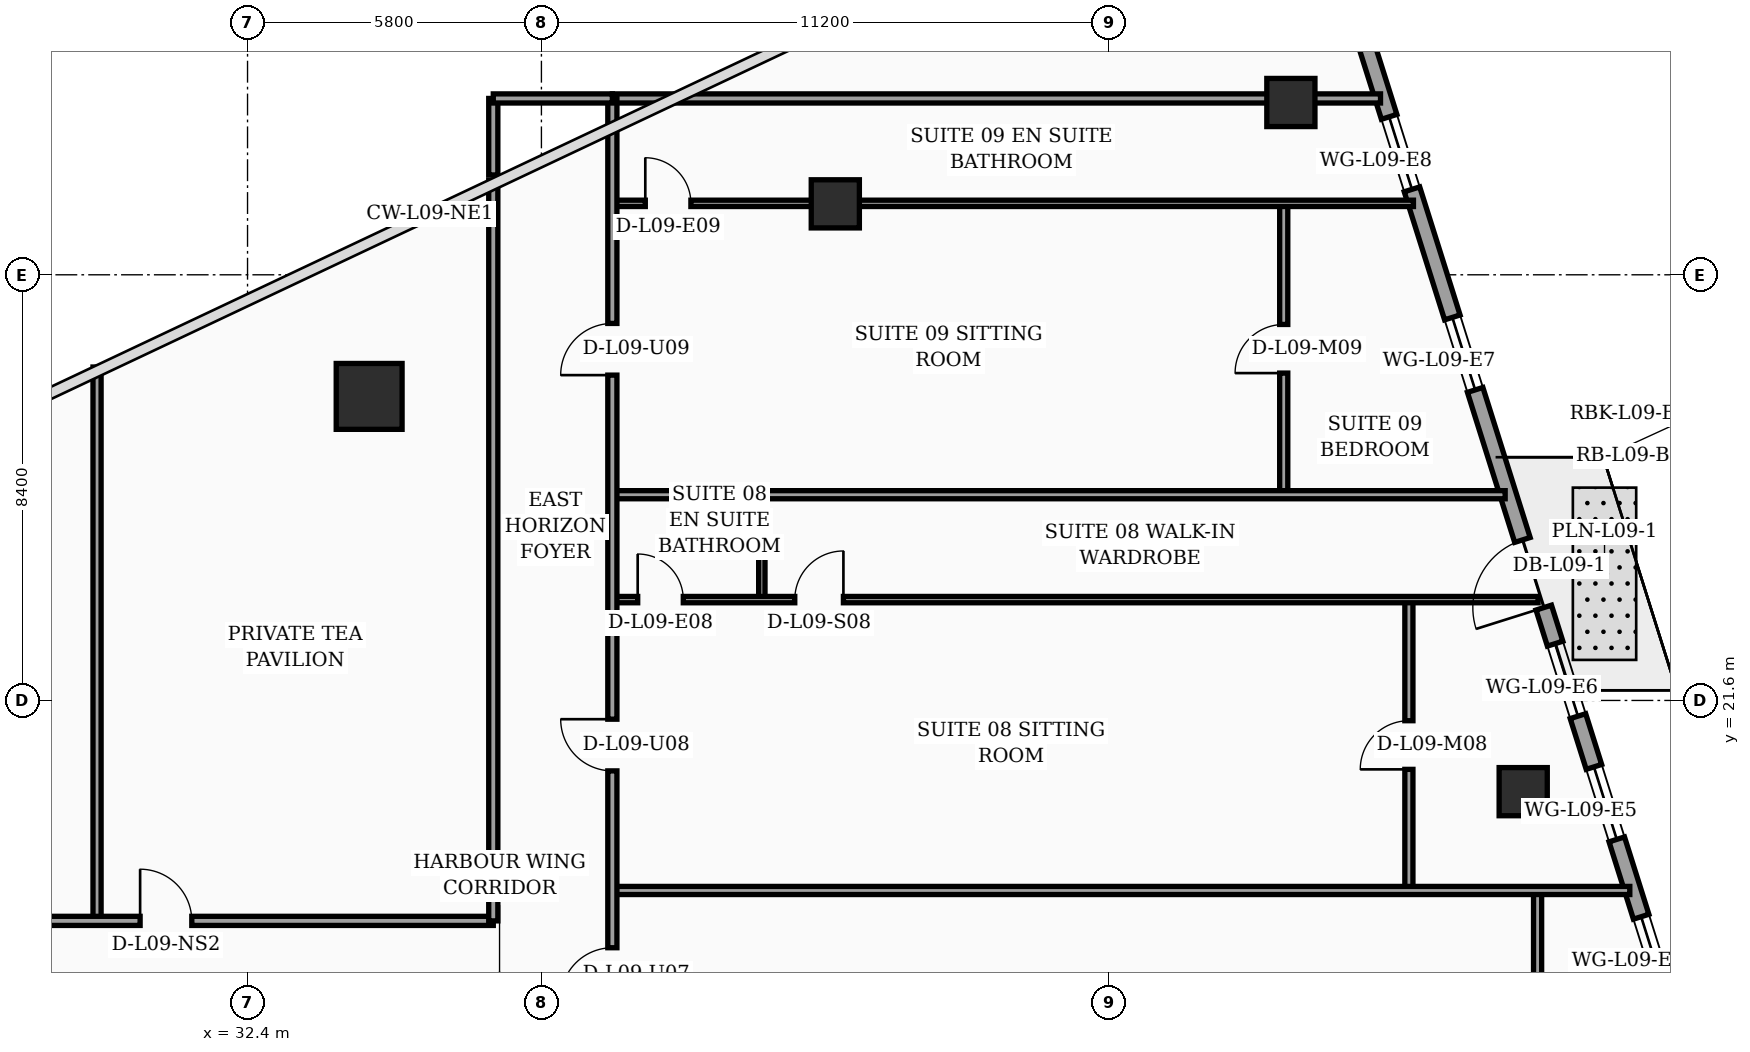
"""IFC4 building model, lengths in metres.
Left out: names, types, materials, properties, quantities, classifications, styles, units other than length and angle.
Written with IfcOpenShell. Run it as: python <this file> out.ifc"""

import sys

from ifc_helpers import new_model, si_unit, direction, frame, frame_2d, origin, origin_2d, place, context, subcontext, project, spatial, rectangle, hollow_rectangle, circle, extrude, element, fill, save


model = new_model("IFC4")
c1 = context("Model", 3, precision=1e-05, world=origin(), true_north=direction((0.0, 1.0)))
c2 = subcontext(c1, "Body", "Model", "MODEL_VIEW")
j1 = project(units=[si_unit("LENGTHUNIT", "METRE"), si_unit("PLANEANGLEUNIT", "RADIAN")], contexts=[c1])
p1 = place(None, origin())
s1 = spatial("IfcSite", under=j1, at=p1, CompositionType="ELEMENT")
p2 = place(p1, origin())
s2 = spatial("IfcBuilding", under=s1, at=p2, CompositionType="ELEMENT")
p3 = place(p2, frame((0.0, 0.0, 42.2)))
s3 = spatial("IfcBuildingStorey", under=s2, at=p3, CompositionType="ELEMENT", Elevation=42.2)
p4 = place(p3, frame((34.8, 27.6, 0.0), z_axis=(0.0, 0.0, 1.0), x_axis=(1.0, 0.0, 0.0)))
e1 = element("IfcColumn", 1, at=p4, inside=s3, PredefinedType="COLUMN", context=c2, shape_type="SweptSolid", body=[
    extrude(circle(Radius=0.65, at=origin_2d()), origin(), (0.0, 0.0, 1.0), 3.52),
])
for number, where, z_axis, x_axis in (
    (2, (44.0, 31.4, 0.0), (0.0, 0.0, 1.0), (1.0, 0.0, 0.0)),
    (3, (57.576, 19.8, 0.0), (0.0, 0.0, 1.0), (1.0, 0.0, 0.0)),
    (4, (52.991, 33.4, 0.0), (0.0, 0.0, 1.0), (1.0, 0.0, 0.0)),
):
    element("IfcColumn", number, at=place(p3, frame(where, z_axis=z_axis, x_axis=x_axis)), inside=s3, PredefinedType="COLUMN", context=c2, shape_type="SweptSolid", body=[
        extrude(hollow_rectangle(XDim=0.95, YDim=0.95, WallThickness=0.04, at=origin_2d()), origin(), (0.0, 0.0, 1.0), 3.52),
    ])
p5 = place(p3, frame((63.63, 5.505, 0.0), z_axis=(0.0, 0.0, 1.0), x_axis=(-0.300501856448, 0.953781229775, 0.0)))
e5 = element("IfcWall", 5, at=p5, inside=s3, PredefinedType="SOLIDWALL", context=c2, shape_type="SweptSolid", body=[
    extrude(rectangle(XDim=30.814, YDim=0.32, at=frame_2d((15.407, 0.0))), origin(), (0.0, 0.0, 1.0), 3.52),
])
p6 = place(p5, frame((18.796, 0.0, 0.0)))
e6 = element("IfcOpeningElement", 6, at=p6, cuts=e5, PredefinedType="OPENING", context=c2, shape_type="SweptSolid", body=[
    extrude(rectangle(XDim=1.4, YDim=2.25, at=frame_2d((0.7, 1.125))), frame((0.0, 0.17, 0.0), z_axis=(0.0, -1.0, 0.0), x_axis=(1.0, 0.0, 0.0)), (0.0, 0.0, 1.0), 0.34),
])
p7 = place(p5, frame((2.65, 0.0, 0.75)))
e7 = element("IfcOpeningElement", 7, at=p7, cuts=e5, PredefinedType="OPENING", context=c2, shape_type="SweptSolid", body=[
    extrude(rectangle(XDim=1.5, YDim=1.6, at=frame_2d((0.75, 0.8))), frame((0.0, 0.17, 0.0), z_axis=(0.0, -1.0, 0.0), x_axis=(1.0, 0.0, 0.0)), (0.0, 0.0, 1.0), 0.34),
])
p8 = place(p5, frame((4.7, 0.0, 0.75)))
e8 = element("IfcOpeningElement", 8, at=p8, cuts=e5, PredefinedType="OPENING", context=c2, shape_type="SweptSolid", body=[
    extrude(rectangle(XDim=1.5, YDim=1.6, at=frame_2d((0.75, 0.8))), frame((0.0, 0.17, 0.0), z_axis=(0.0, -1.0, 0.0), x_axis=(1.0, 0.0, 0.0)), (0.0, 0.0, 1.0), 0.34),
])
p9 = place(p5, frame((7.8, 0.0, 0.75)))
e9 = element("IfcOpeningElement", 9, at=p9, cuts=e5, PredefinedType="OPENING", context=c2, shape_type="SweptSolid", body=[
    extrude(rectangle(XDim=1.5, YDim=1.6, at=frame_2d((0.75, 0.8))), frame((0.0, 0.17, 0.0), z_axis=(0.0, -1.0, 0.0), x_axis=(1.0, 0.0, 0.0)), (0.0, 0.0, 1.0), 0.34),
])
p10 = place(p5, frame((10.9, 0.0, 0.75)))
e10 = element("IfcOpeningElement", 10, at=p10, cuts=e5, PredefinedType="OPENING", context=c2, shape_type="SweptSolid", body=[
    extrude(rectangle(XDim=1.5, YDim=1.6, at=frame_2d((0.75, 0.8))), frame((0.0, 0.17, 0.0), z_axis=(0.0, -1.0, 0.0), x_axis=(1.0, 0.0, 0.0)), (0.0, 0.0, 1.0), 0.34),
])
p11 = place(p5, frame((14.0, 0.0, 0.75)))
e11 = element("IfcOpeningElement", 11, at=p11, cuts=e5, PredefinedType="OPENING", context=c2, shape_type="SweptSolid", body=[
    extrude(rectangle(XDim=1.5, YDim=1.6, at=frame_2d((0.75, 0.8))), frame((0.0, 0.17, 0.0), z_axis=(0.0, -1.0, 0.0), x_axis=(1.0, 0.0, 0.0)), (0.0, 0.0, 1.0), 0.34),
])
p12 = place(p5, frame((16.55, 0.0, 0.75)))
e12 = element("IfcOpeningElement", 12, at=p12, cuts=e5, PredefinedType="OPENING", context=c2, shape_type="SweptSolid", body=[
    extrude(rectangle(XDim=1.5, YDim=1.6, at=frame_2d((0.75, 0.8))), frame((0.0, 0.17, 0.0), z_axis=(0.0, -1.0, 0.0), x_axis=(1.0, 0.0, 0.0)), (0.0, 0.0, 1.0), 0.34),
])
p13 = place(p5, frame((23.3, 0.0, 0.75)))
e13 = element("IfcOpeningElement", 13, at=p13, cuts=e5, PredefinedType="OPENING", context=c2, shape_type="SweptSolid", body=[
    extrude(rectangle(XDim=1.5, YDim=1.6, at=frame_2d((0.75, 0.8))), frame((0.0, 0.17, 0.0), z_axis=(0.0, -1.0, 0.0), x_axis=(1.0, 0.0, 0.0)), (0.0, 0.0, 1.0), 0.34),
])
p14 = place(p5, frame((27.45, 0.0, 0.75)))
e14 = element("IfcOpeningElement", 14, at=p14, cuts=e5, PredefinedType="OPENING", context=c2, shape_type="SweptSolid", body=[
    extrude(rectangle(XDim=1.5, YDim=1.6, at=frame_2d((0.75, 0.8))), frame((0.0, 0.17, 0.0), z_axis=(0.0, -1.0, 0.0), x_axis=(1.0, 0.0, 0.0)), (0.0, 0.0, 1.0), 0.34),
])
p15 = place(p3, frame((29.43, 17.25, 0.0), z_axis=(0.0, 0.0, 1.0), x_axis=(0.0, 1.0, 0.0)))
e15 = element("IfcWall", 15, at=p15, inside=s3, PredefinedType="PARTITIONING", context=c2, shape_type="SweptSolid", body=[
    extrude(rectangle(XDim=10.93, YDim=0.16, at=frame_2d((5.465, 0.0))), origin(), (0.0, 0.0, 1.0), 2.82),
])
p16 = place(p3, frame((21.5, 17.25, 0.0), z_axis=(0.0, 0.0, 1.0), x_axis=(1.0, 0.0, 0.0)))
e16 = element("IfcWall", 16, at=p16, inside=s3, PredefinedType="PARTITIONING", context=c2, shape_type="SweptSolid", body=[
    extrude(rectangle(XDim=15.75, YDim=0.18, at=frame_2d((7.875, 0.0))), origin(), (0.0, 0.0, 1.0), 2.82),
])
p17 = place(p16, frame((0.95, 0.0, 0.0)))
e17 = element("IfcOpeningElement", 17, at=p17, cuts=e16, PredefinedType="OPENING", context=c2, shape_type="SweptSolid", body=[
    extrude(rectangle(XDim=1.02, YDim=2.2, at=frame_2d((0.51, 1.1))), frame((0.0, 0.1, 0.0), z_axis=(0.0, -1.0, 0.0), x_axis=(1.0, 0.0, 0.0)), (0.0, 0.0, 1.0), 0.2),
])
p18 = place(p16, frame((8.78, 0.0, 0.0)))
e18 = element("IfcOpeningElement", 18, at=p18, cuts=e16, PredefinedType="OPENING", context=c2, shape_type="SweptSolid", body=[
    extrude(rectangle(XDim=1.02, YDim=2.2, at=frame_2d((0.51, 1.1))), frame((0.0, 0.1, 0.0), z_axis=(0.0, -1.0, 0.0), x_axis=(1.0, 0.0, 0.0)), (0.0, 0.0, 1.0), 0.2),
])
p19 = place(p3, frame((37.25, 17.25, 0.0), z_axis=(0.0, 0.0, 1.0), x_axis=(0.0, 1.0, 0.0)))
e19 = element("IfcWall", 19, at=p19, inside=s3, PredefinedType="PARTITIONING", context=c2, shape_type="SweptSolid", body=[
    extrude(rectangle(XDim=14.62, YDim=0.18, at=frame_2d((7.31, 0.0))), origin(), (0.0, 0.0, 1.0), 2.82),
])
p20 = place(p3, frame((57.86, 7.45, 0.0), z_axis=(0.0, 0.0, 1.0), x_axis=(0.0, 1.0, 0.0)))
e20 = element("IfcWall", 20, at=p20, inside=s3, PredefinedType="PARTITIONING", context=c2, shape_type="SweptSolid", body=[
    extrude(rectangle(XDim=10.4, YDim=0.16, at=frame_2d((5.2, 0.0))), origin(), (0.0, 0.0, 1.0), 3.02),
])
p21 = place(p20, frame((4.72, 0.0, 0.0)))
e21 = element("IfcOpeningElement", 21, at=p21, cuts=e20, PredefinedType="OPENING", context=c2, shape_type="SweptSolid", body=[
    extrude(rectangle(XDim=0.96, YDim=2.2, at=frame_2d((0.48, 1.1))), frame((0.0, 0.09, 0.0), z_axis=(0.0, -1.0, 0.0), x_axis=(1.0, 0.0, 0.0)), (0.0, 0.0, 1.0), 0.18),
])
p22 = place(p3, frame((42.55, 23.59, 0.0), z_axis=(0.0, 0.0, 1.0), x_axis=(0.0, 1.0, 0.0)))
e22 = element("IfcWall", 22, at=p22, inside=s3, PredefinedType="PARTITIONING", context=c2, shape_type="SweptSolid", body=[
    extrude(rectangle(XDim=2.07, YDim=0.125, at=frame_2d((1.035, 0.0))), origin(), (0.0, 0.0, 1.0), 2.82),
])
p23 = place(p3, frame((55.32, 17.85, 0.0), z_axis=(0.0, 0.0, 1.0), x_axis=(0.0, 1.0, 0.0)))
e23 = element("IfcWall", 23, at=p23, inside=s3, PredefinedType="PARTITIONING", context=c2, shape_type="SweptSolid", body=[
    extrude(rectangle(XDim=5.74, YDim=0.16, at=frame_2d((2.87, 0.0))), origin(), (0.0, 0.0, 1.0), 2.82),
])
p24 = place(p23, frame((2.39, 0.0, 0.0)))
e24 = element("IfcOpeningElement", 24, at=p24, cuts=e23, PredefinedType="OPENING", context=c2, shape_type="SweptSolid", body=[
    extrude(rectangle(XDim=0.96, YDim=2.2, at=frame_2d((0.48, 1.1))), frame((0.0, 0.09, 0.0), z_axis=(0.0, -1.0, 0.0), x_axis=(1.0, 0.0, 0.0)), (0.0, 0.0, 1.0), 0.18),
])
p25 = place(p3, frame((39.6, 23.59, 0.0), z_axis=(0.0, 0.0, 1.0), x_axis=(1.0, 0.0, 0.0)))
e25 = element("IfcWall", 25, at=p25, inside=s3, PredefinedType="PARTITIONING", context=c2, shape_type="SweptSolid", body=[
    extrude(rectangle(XDim=18.27, YDim=0.125, at=frame_2d((9.135, 0.0))), origin(), (0.0, 0.0, 1.0), 2.82),
])
p26 = place(p25, frame((0.5, 0.0, 0.0)))
e26 = element("IfcOpeningElement", 26, at=p26, cuts=e25, PredefinedType="OPENING", context=c2, shape_type="SweptSolid", body=[
    extrude(rectangle(XDim=0.9, YDim=2.15, at=frame_2d((0.45, 1.075))), frame((0.0, 0.073, 0.0), z_axis=(0.0, -1.0, 0.0), x_axis=(1.0, 0.0, 0.0)), (0.0, 0.0, 1.0), 0.145),
])
p27 = place(p25, frame((3.6, 0.0, 0.0)))
e27 = element("IfcOpeningElement", 27, at=p27, cuts=e25, PredefinedType="OPENING", context=c2, shape_type="SweptSolid", body=[
    extrude(rectangle(XDim=0.96, YDim=2.2, at=frame_2d((0.48, 1.1))), frame((0.0, 0.073, 0.0), z_axis=(0.0, -1.0, 0.0), x_axis=(1.0, 0.0, 0.0)), (0.0, 0.0, 1.0), 0.145),
])
p28 = place(p3, frame((52.85, 25.66, 0.0), z_axis=(0.0, 0.0, 1.0), x_axis=(0.0, 1.0, 0.0)))
e28 = element("IfcWall", 28, at=p28, inside=s3, PredefinedType="PARTITIONING", context=c2, shape_type="SweptSolid", body=[
    extrude(rectangle(XDim=5.75, YDim=0.16, at=frame_2d((2.875, 0.0))), origin(), (0.0, 0.0, 1.0), 3.52),
])
p29 = place(p28, frame((2.4, 0.0, 0.0)))
e29 = element("IfcOpeningElement", 29, at=p29, cuts=e28, PredefinedType="OPENING", context=c2, shape_type="SweptSolid", body=[
    extrude(rectangle(XDim=0.96, YDim=2.2, at=frame_2d((0.48, 1.1))), frame((0.0, 0.09, 0.0), z_axis=(0.0, -1.0, 0.0), x_axis=(1.0, 0.0, 0.0)), (0.0, 0.0, 1.0), 0.18),
])
p30 = place(p3, frame((39.6, 31.41, 0.0), z_axis=(0.0, 0.0, 1.0), x_axis=(1.0, 0.0, 0.0)))
e30 = element("IfcWall", 30, at=p30, inside=s3, PredefinedType="PARTITIONING", context=c2, shape_type="SweptSolid", body=[
    extrude(rectangle(XDim=15.81, YDim=0.125, at=frame_2d((7.905, 0.0))), origin(), (0.0, 0.0, 1.0), 2.82),
])
p31 = place(p30, frame((0.65, 0.0, 0.0)))
e31 = element("IfcOpeningElement", 31, at=p31, cuts=e30, PredefinedType="OPENING", context=c2, shape_type="SweptSolid", body=[
    extrude(rectangle(XDim=0.9, YDim=2.15, at=frame_2d((0.45, 1.075))), frame((0.0, 0.073, 0.0), z_axis=(0.0, -1.0, 0.0), x_axis=(1.0, 0.0, 0.0)), (0.0, 0.0, 1.0), 0.145),
])
p32 = place(p3, frame((39.6, 25.66, 0.0), z_axis=(0.0, 0.0, 1.0), x_axis=(1.0, 0.0, 0.0)))
e32 = element("IfcWall", 32, at=p32, inside=s3, PredefinedType="PARTITIONING", context=c2, shape_type="SweptSolid", body=[
    extrude(rectangle(XDim=17.62, YDim=0.16, at=frame_2d((8.81, 0.0))), origin(), (0.0, 0.0, 1.0), 2.82),
])
p33 = place(p3, frame((39.6, 17.85, 0.0), z_axis=(0.0, 0.0, 1.0), x_axis=(1.0, 0.0, 0.0)))
e33 = element("IfcWall", 33, at=p33, inside=s3, PredefinedType="PARTITIONING", context=c2, shape_type="SweptSolid", body=[
    extrude(rectangle(XDim=20.08, YDim=0.16, at=frame_2d((10.04, 0.0))), origin(), (0.0, 0.0, 1.0), 2.82),
])
p34 = place(p3, frame((39.6, 33.48, 0.0), z_axis=(0.0, 0.0, 1.0), x_axis=(1.0, 0.0, 0.0)))
e34 = element("IfcWall", 34, at=p34, inside=s3, PredefinedType="PARTITIONING", context=c2, shape_type="SweptSolid", body=[
    extrude(rectangle(XDim=15.16, YDim=0.18, at=frame_2d((7.58, 0.0))), origin(), (0.0, 0.0, 1.0), 2.82),
])
p35 = place(p3, frame((39.6, 2.44, 0.0), z_axis=(0.0, 0.0, 1.0), x_axis=(0.0, 1.0, 0.0)))
e35 = element("IfcWall", 35, at=p35, inside=s3, PredefinedType="PARTITIONING", context=c2, shape_type="SweptSolid", body=[
    extrude(rectangle(XDim=31.04, YDim=0.18, at=frame_2d((15.52, 0.0))), origin(), (0.0, 0.0, 1.0), 2.82),
])
p36 = place(p35, frame((13.26, 0.0, 0.0)))
e36 = element("IfcOpeningElement", 36, at=p36, cuts=e35, PredefinedType="OPENING", context=c2, shape_type="SweptSolid", body=[
    extrude(rectangle(XDim=1.02, YDim=2.2, at=frame_2d((0.51, 1.1))), frame((0.0, 0.1, 0.0), z_axis=(0.0, -1.0, 0.0), x_axis=(1.0, 0.0, 0.0)), (0.0, 0.0, 1.0), 0.2),
])
p37 = place(p35, frame((17.77, 0.0, 0.0)))
e37 = element("IfcOpeningElement", 37, at=p37, cuts=e35, PredefinedType="OPENING", context=c2, shape_type="SweptSolid", body=[
    extrude(rectangle(XDim=1.02, YDim=2.2, at=frame_2d((0.51, 1.1))), frame((0.0, 0.1, 0.0), z_axis=(0.0, -1.0, 0.0), x_axis=(1.0, 0.0, 0.0)), (0.0, 0.0, 1.0), 0.2),
])
p38 = place(p35, frame((25.58, 0.0, 0.0)))
e38 = element("IfcOpeningElement", 38, at=p38, cuts=e35, PredefinedType="OPENING", context=c2, shape_type="SweptSolid", body=[
    extrude(rectangle(XDim=1.02, YDim=2.2, at=frame_2d((0.51, 1.1))), frame((0.0, 0.1, 0.0), z_axis=(0.0, -1.0, 0.0), x_axis=(1.0, 0.0, 0.0)), (0.0, 0.0, 1.0), 0.2),
])
p39 = place(p3, frame((37.25, 31.97, 0.0), z_axis=(0.0, 0.0, 1.0), x_axis=(0.0, 1.0, 0.0)))
e39 = element("IfcWall", 39, at=p39, inside=s3, PredefinedType="PARTITIONING", context=c2, shape_type="SweptSolid", body=[
    extrude(rectangle(XDim=1.51, YDim=0.18, at=frame_2d((0.755, 0.0))), origin(), (0.0, 0.0, 1.0), 3.52),
])
p40 = place(p3, frame((37.25, 33.48, 0.0), z_axis=(0.0, 0.0, 1.0), x_axis=(1.0, 0.0, 0.0)))
e40 = element("IfcWall", 40, at=p40, inside=s3, PredefinedType="PARTITIONING", context=c2, shape_type="SweptSolid", body=[
    extrude(rectangle(XDim=2.35, YDim=0.18, at=frame_2d((1.175, 0.0))), origin(), (0.0, 0.0, 1.0), 3.52),
])
p41 = place(p6, origin())
e41 = element("IfcDoor", 41, at=p41, inside=s3, OperationType="SINGLE_SWING_LEFT", PredefinedType="DOOR", context=c2, shape_type="SweptSolid", body=[
    extrude(rectangle(XDim=1.4, YDim=2.25, at=frame_2d((0.7, 1.125))), frame((0.0, 0.025, 0.0), z_axis=(0.0, -1.0, 0.0), x_axis=(1.0, 0.0, 0.0)), (0.0, 0.0, 1.0), 0.05),
])
fill(e6, e41)
p42 = place(p10, origin())
e42 = element("IfcWindow", 42, at=p42, inside=s3, PartitioningType="SINGLE_PANEL", PredefinedType="WINDOW", context=c2, shape_type="SweptSolid", body=[
    extrude(rectangle(XDim=1.5, YDim=1.6, at=frame_2d((0.75, 0.8))), frame((0.0, 0.03, 0.0), z_axis=(0.0, -1.0, 0.0), x_axis=(1.0, 0.0, 0.0)), (0.0, 0.0, 1.0), 0.06),
])
fill(e10, e42)
p43 = place(p11, origin())
e43 = element("IfcWindow", 43, at=p43, inside=s3, PartitioningType="SINGLE_PANEL", PredefinedType="WINDOW", context=c2, shape_type="SweptSolid", body=[
    extrude(rectangle(XDim=1.5, YDim=1.6, at=frame_2d((0.75, 0.8))), frame((0.0, 0.03, 0.0), z_axis=(0.0, -1.0, 0.0), x_axis=(1.0, 0.0, 0.0)), (0.0, 0.0, 1.0), 0.06),
])
fill(e11, e43)
p44 = place(p12, origin())
e44 = element("IfcWindow", 44, at=p44, inside=s3, PartitioningType="SINGLE_PANEL", PredefinedType="WINDOW", context=c2, shape_type="SweptSolid", body=[
    extrude(rectangle(XDim=1.5, YDim=1.6, at=frame_2d((0.75, 0.8))), frame((0.0, 0.03, 0.0), z_axis=(0.0, -1.0, 0.0), x_axis=(1.0, 0.0, 0.0)), (0.0, 0.0, 1.0), 0.06),
])
fill(e12, e44)
p45 = place(p13, origin())
e45 = element("IfcWindow", 45, at=p45, inside=s3, PartitioningType="SINGLE_PANEL", PredefinedType="WINDOW", context=c2, shape_type="SweptSolid", body=[
    extrude(rectangle(XDim=1.5, YDim=1.6, at=frame_2d((0.75, 0.8))), frame((0.0, 0.03, 0.0), z_axis=(0.0, -1.0, 0.0), x_axis=(1.0, 0.0, 0.0)), (0.0, 0.0, 1.0), 0.06),
])
fill(e13, e45)
p46 = place(p14, origin())
e46 = element("IfcWindow", 46, at=p46, inside=s3, PartitioningType="SINGLE_PANEL", PredefinedType="WINDOW", context=c2, shape_type="SweptSolid", body=[
    extrude(rectangle(XDim=1.5, YDim=1.6, at=frame_2d((0.75, 0.8))), frame((0.0, 0.03, 0.0), z_axis=(0.0, -1.0, 0.0), x_axis=(1.0, 0.0, 0.0)), (0.0, 0.0, 1.0), 0.06),
])
fill(e14, e46)
p47 = place(p18, origin())
e47 = element("IfcDoor", 47, at=p47, inside=s3, OperationType="SINGLE_SWING_LEFT", PredefinedType="DOOR", context=c2, shape_type="SweptSolid", body=[
    extrude(rectangle(XDim=1.02, YDim=2.2, at=frame_2d((0.51, 1.1))), frame((0.0, 0.025, 0.0), z_axis=(0.0, -1.0, 0.0), x_axis=(1.0, 0.0, 0.0)), (0.0, 0.0, 1.0), 0.05),
])
fill(e18, e47)
p48 = place(p24, origin())
e48 = element("IfcDoor", 48, at=p48, inside=s3, OperationType="SINGLE_SWING_LEFT", PredefinedType="DOOR", context=c2, shape_type="SweptSolid", body=[
    extrude(rectangle(XDim=0.96, YDim=2.2, at=frame_2d((0.48, 1.1))), frame((0.0, 0.025, 0.0), z_axis=(0.0, -1.0, 0.0), x_axis=(1.0, 0.0, 0.0)), (0.0, 0.0, 1.0), 0.05),
])
fill(e24, e48)
p49 = place(p26, origin())
e49 = element("IfcDoor", 49, at=p49, inside=s3, OperationType="SINGLE_SWING_LEFT", PredefinedType="DOOR", context=c2, shape_type="SweptSolid", body=[
    extrude(rectangle(XDim=0.9, YDim=2.15, at=frame_2d((0.45, 1.075))), frame((0.0, 0.025, 0.0), z_axis=(0.0, -1.0, 0.0), x_axis=(1.0, 0.0, 0.0)), (0.0, 0.0, 1.0), 0.05),
])
fill(e26, e49)
p50 = place(p27, origin())
e50 = element("IfcDoor", 50, at=p50, inside=s3, OperationType="SINGLE_SWING_RIGHT", PredefinedType="DOOR", context=c2, shape_type="SweptSolid", body=[
    extrude(rectangle(XDim=0.96, YDim=2.2, at=frame_2d((0.48, 1.1))), frame((0.0, 0.025, 0.0), z_axis=(0.0, -1.0, 0.0), x_axis=(1.0, 0.0, 0.0)), (0.0, 0.0, 1.0), 0.05),
])
fill(e27, e50)
p51 = place(p29, origin())
e51 = element("IfcDoor", 51, at=p51, inside=s3, OperationType="SINGLE_SWING_LEFT", PredefinedType="DOOR", context=c2, shape_type="SweptSolid", body=[
    extrude(rectangle(XDim=0.96, YDim=2.2, at=frame_2d((0.48, 1.1))), frame((0.0, 0.025, 0.0), z_axis=(0.0, -1.0, 0.0), x_axis=(1.0, 0.0, 0.0)), (0.0, 0.0, 1.0), 0.05),
])
fill(e29, e51)
p52 = place(p31, origin())
e52 = element("IfcDoor", 52, at=p52, inside=s3, OperationType="SINGLE_SWING_LEFT", PredefinedType="DOOR", context=c2, shape_type="SweptSolid", body=[
    extrude(rectangle(XDim=0.9, YDim=2.15, at=frame_2d((0.45, 1.075))), frame((0.0, 0.025, 0.0), z_axis=(0.0, -1.0, 0.0), x_axis=(1.0, 0.0, 0.0)), (0.0, 0.0, 1.0), 0.05),
])
fill(e31, e52)
p53 = place(p36, origin())
e53 = element("IfcDoor", 53, at=p53, inside=s3, OperationType="SINGLE_SWING_LEFT", PredefinedType="DOOR", context=c2, shape_type="SweptSolid", body=[
    extrude(rectangle(XDim=1.02, YDim=2.2, at=frame_2d((0.51, 1.1))), frame((0.0, 0.025, 0.0), z_axis=(0.0, -1.0, 0.0), x_axis=(1.0, 0.0, 0.0)), (0.0, 0.0, 1.0), 0.05),
])
fill(e36, e53)
p54 = place(p37, origin())
e54 = element("IfcDoor", 54, at=p54, inside=s3, OperationType="SINGLE_SWING_RIGHT", PredefinedType="DOOR", context=c2, shape_type="SweptSolid", body=[
    extrude(rectangle(XDim=1.02, YDim=2.2, at=frame_2d((0.51, 1.1))), frame((0.0, 0.025, 0.0), z_axis=(0.0, -1.0, 0.0), x_axis=(1.0, 0.0, 0.0)), (0.0, 0.0, 1.0), 0.05),
])
fill(e37, e54)
p55 = place(p38, origin())
e55 = element("IfcDoor", 55, at=p55, inside=s3, OperationType="SINGLE_SWING_LEFT", PredefinedType="DOOR", context=c2, shape_type="SweptSolid", body=[
    extrude(rectangle(XDim=1.02, YDim=2.2, at=frame_2d((0.51, 1.1))), frame((0.0, 0.025, 0.0), z_axis=(0.0, -1.0, 0.0), x_axis=(1.0, 0.0, 0.0)), (0.0, 0.0, 1.0), 0.05),
])
fill(e38, e55)
save(model, sys.argv[1])
